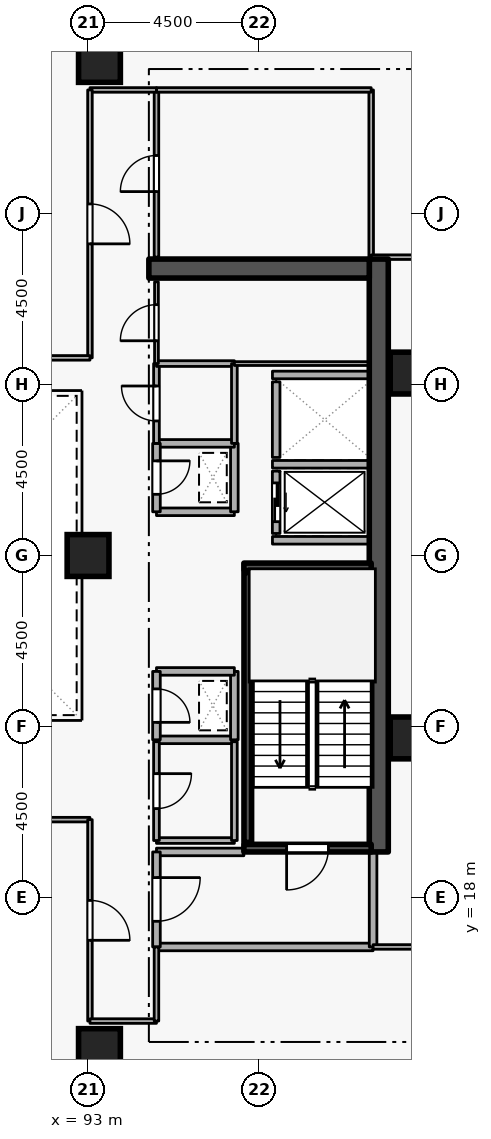
"""IFC4 building model, lengths in metres.
Left out: names, types, materials, properties, quantities, classifications, styles, units other than length and angle.
Written with IfcOpenShell. Run it as: python <this file> out.ifc"""

import sys

from ifc_helpers import new_model, si_unit, direction, frame, frame_2d, origin, origin_2d, place, context, subcontext, project, spatial, rectangle, extrude, element, fill, save


model = new_model("IFC4")
c1 = context("Model", 3, precision=1e-05, world=origin(), true_north=direction((0.0, 1.0)))
c2 = subcontext(c1, "Body", "Model", "MODEL_VIEW")
j1 = project(units=[si_unit("LENGTHUNIT", "METRE"), si_unit("PLANEANGLEUNIT", "RADIAN")], contexts=[c1])
p1 = place(None, origin())
s1 = spatial("IfcSite", under=j1, at=p1, CompositionType="ELEMENT")
p2 = place(p1, origin())
s2 = spatial("IfcBuilding", under=s1, at=p2, CompositionType="ELEMENT")
p3 = place(p2, frame((0.0, 0.0, 152.7)))
s3 = spatial("IfcBuildingStorey", under=s2, at=p3, CompositionType="ELEMENT", Elevation=152.7)
p4 = place(p3, frame((100.65, 19.2, 0.0), z_axis=(0.0, 0.0, 1.0), x_axis=(0.0, 1.0, 0.0)))
e1 = element("IfcWall", 1, at=p4, inside=s3, PredefinedType="SHEAR", context=c2, shape_type="SweptSolid", body=[
    extrude(rectangle(XDim=15.6, YDim=0.5, at=frame_2d((7.8, 0.0))), origin(), (0.0, 0.0, 1.0), 3.6),
])
p5 = place(p3, frame((94.6, 34.55, 0.0), z_axis=(0.0, 0.0, 1.0), x_axis=(1.0, 0.0, 0.0)))
e2 = element("IfcWall", 2, at=p5, inside=s3, PredefinedType="SHEAR", context=c2, shape_type="SweptSolid", body=[
    extrude(rectangle(XDim=5.8, YDim=0.5, at=frame_2d((2.9, 0.0))), origin(), (0.0, 0.0, 1.0), 3.6),
])
for number, where, z_axis, x_axis in (
    (3, (93.3, 14.0, 0.0), (0.0, 0.0, 1.0), (1.0, 0.0, 0.0)),
    (4, (93.3, 40.0, 0.0), (0.0, 0.0, 1.0), (1.0, 0.0, 0.0)),
    (5, (101.5, 22.2, 0.0), (0.0, 0.0, 1.0), (1.0, 0.0, 0.0)),
    (6, (101.5, 31.8, 0.0), (0.0, 0.0, 1.0), (1.0, 0.0, 0.0)),
    (7, (93.0, 27.0, 0.0), (0.0, 0.0, 1.0), (1.0, 0.0, 0.0)),
):
    element("IfcColumn", number, at=place(p3, frame(where, z_axis=z_axis, x_axis=x_axis)), inside=s3, PredefinedType="COLUMN", context=c2, shape_type="SweptSolid", body=[
        extrude(rectangle(XDim=1.1, YDim=1.1, at=origin_2d()), origin(), (0.0, 0.0, 1.0), 3.6),
    ])
p6 = place(p3, frame((97.95, 29.22, 0.0), z_axis=(0.0, 0.0, 1.0), x_axis=(0.0, -1.0, 0.0)))
e8 = element("IfcWall", 8, at=p6, inside=s3, PredefinedType="STANDARD", context=c2, shape_type="SweptSolid", body=[
    extrude(rectangle(XDim=1.64, YDim=0.2, at=frame_2d((0.82, 0.0))), origin(), (0.0, 0.0, 1.0), 3.34),
])
p7 = place(p6, frame((0.31, 0.0, 0.0)))
e9 = element("IfcOpeningElement", 9, at=p7, cuts=e8, PredefinedType="OPENING", context=c2, shape_type="SweptSolid", body=[
    extrude(rectangle(XDim=1.02, YDim=2.06, at=frame_2d((0.51, 1.03))), frame((0.0, 0.11, 0.0), z_axis=(0.0, -1.0, 0.0), x_axis=(1.0, 0.0, 0.0)), (0.0, 0.0, 1.0), 0.22),
])
p8 = place(p3, frame((97.95, 31.57, 0.0), z_axis=(0.0, 0.0, 1.0), x_axis=(0.0, -1.0, 0.0)))
e10 = element("IfcWall", 10, at=p8, inside=s3, PredefinedType="STANDARD", context=c2, shape_type="SweptSolid", body=[
    extrude(rectangle(XDim=1.99, YDim=0.2, at=frame_2d((0.995, 0.0))), origin(), (0.0, 0.0, 1.0), 3.34),
])
for number, where, z_axis, x_axis in (
    (11, (97.852, 29.4, 0.0), (0.0, 0.0, 1.0), (1.0, 0.0, 0.0)),
    (12, (97.852, 27.4, 0.0), (0.0, 0.0, 1.0), (1.0, 0.0, 0.0)),
    (13, (97.852, 31.75, 0.0), (0.0, 0.0, 1.0), (1.0, 0.0, 0.0)),
):
    element("IfcWall", number, at=place(p3, frame(where, z_axis=z_axis, x_axis=x_axis)), inside=s3, PredefinedType="STANDARD", context=c2, shape_type="SweptSolid", body=[
        extrude(rectangle(XDim=2.536, YDim=0.2, at=frame_2d((1.268, 0.0))), origin(), (0.0, 0.0, 1.0), 3.34),
    ])
p9 = place(p3, frame((100.45, 19.3, 0.0), z_axis=(0.0, 0.0, 1.0), x_axis=(-1.0, 0.0, 0.0)))
e14 = element("IfcWall", 14, at=p9, inside=s3, PredefinedType="SHEAR", context=c2, shape_type="SweptSolid", body=[
    extrude(rectangle(XDim=3.35, YDim=0.2, at=frame_2d((1.675, 0.0))), origin(), (0.0, 0.0, 1.0), 3.6),
])
p10 = place(p9, frame((1.125, 0.0, 0.0)))
e15 = element("IfcOpeningElement", 15, at=p10, cuts=e14, PredefinedType="OPENING", context=c2, shape_type="SweptSolid", body=[
    extrude(rectangle(XDim=1.1, YDim=2.1, at=frame_2d((0.55, 1.05))), frame((0.0, 0.11, 0.0), z_axis=(0.0, -1.0, 0.0), x_axis=(1.0, 0.0, 0.0)), (0.0, 0.0, 1.0), 0.22),
])
p11 = place(p3, frame((97.1, 26.7, 0.0), z_axis=(0.0, 0.0, 1.0), x_axis=(1.0, 0.0, 0.0)))
e16 = element("IfcWall", 16, at=p11, inside=s3, PredefinedType="SHEAR", context=c2, shape_type="SweptSolid", body=[
    extrude(rectangle(XDim=3.35, YDim=0.2, at=frame_2d((1.675, 0.0))), origin(), (0.0, 0.0, 1.0), 3.6),
])
p12 = place(p3, frame((97.203, 26.55, 0.0), z_axis=(0.0, 0.0, 1.0), x_axis=(0.0, -1.0, 0.0)))
e17 = element("IfcWall", 17, at=p12, inside=s3, PredefinedType="SHEAR", context=c2, shape_type="SweptSolid", body=[
    extrude(rectangle(XDim=7.1, YDim=0.2, at=frame_2d((3.55, 0.0))), origin(), (0.0, 0.0, 1.0), 3.6),
])
p13 = place(p3, frame((94.8, 16.7, 0.0), z_axis=(0.0, 0.0, 1.0), x_axis=(1.0, 0.0, 0.0)))
e18 = element("IfcWall", 18, at=p13, inside=s3, PredefinedType="STANDARD", context=c2, shape_type="SweptSolid", body=[
    extrude(rectangle(XDim=5.7, YDim=0.2, at=frame_2d((2.85, 0.0))), origin(), (0.0, 0.0, 1.0), 3.34),
])
p14 = place(p3, frame((100.5, 16.7, 0.0), z_axis=(0.0, 0.0, 1.0), x_axis=(0.0, 1.0, 0.0)))
e19 = element("IfcWall", 19, at=p14, inside=s3, PredefinedType="STANDARD", context=c2, shape_type="SweptSolid", body=[
    extrude(rectangle(XDim=2.5, YDim=0.2, at=frame_2d((1.25, 0.0))), origin(), (0.0, 0.0, 1.0), 3.34),
])
p15 = place(p3, frame((97.1, 19.2, 0.0), z_axis=(0.0, 0.0, 1.0), x_axis=(-1.0, 0.0, 0.0)))
e20 = element("IfcWall", 20, at=p15, inside=s3, PredefinedType="STANDARD", context=c2, shape_type="SweptSolid", body=[
    extrude(rectangle(XDim=2.3, YDim=0.2, at=frame_2d((1.15, 0.0))), origin(), (0.0, 0.0, 1.0), 2.545),
])
p16 = place(p3, frame((94.8, 19.2, 0.0), z_axis=(0.0, 0.0, 1.0), x_axis=(0.0, -1.0, 0.0)))
e21 = element("IfcWall", 21, at=p16, inside=s3, PredefinedType="STANDARD", context=c2, shape_type="SweptSolid", body=[
    extrude(rectangle(XDim=2.5, YDim=0.2, at=frame_2d((1.25, 0.0))), origin(), (0.0, 0.0, 1.0), 3.34),
])
p17 = place(p16, frame((0.675, 0.0, 0.0)))
e22 = element("IfcOpeningElement", 22, at=p17, cuts=e21, PredefinedType="OPENING", context=c2, shape_type="SweptSolid", body=[
    extrude(rectangle(XDim=1.15, YDim=2.1, at=frame_2d((0.575, 1.05))), frame((0.0, 0.11, 0.0), z_axis=(0.0, -1.0, 0.0), x_axis=(1.0, 0.0, 0.0)), (0.0, 0.0, 1.0), 0.22),
])
p18 = place(p3, frame((94.8, 28.15, 0.0), z_axis=(0.0, 0.0, 1.0), x_axis=(1.0, 0.0, 0.0)))
e23 = element("IfcWall", 23, at=p18, inside=s3, PredefinedType="STANDARD", context=c2, shape_type="SweptSolid", body=[
    extrude(rectangle(XDim=2.05, YDim=0.2, at=frame_2d((1.025, 0.0))), origin(), (0.0, 0.0, 1.0), 3.34),
])
p19 = place(p3, frame((96.85, 28.15, 0.0), z_axis=(0.0, 0.0, 1.0), x_axis=(0.0, 1.0, 0.0)))
e24 = element("IfcWall", 24, at=p19, inside=s3, PredefinedType="STANDARD", context=c2, shape_type="SweptSolid", body=[
    extrude(rectangle(XDim=1.8, YDim=0.2, at=frame_2d((0.9, 0.0))), origin(), (0.0, 0.0, 1.0), 3.34),
])
p20 = place(p3, frame((96.85, 29.95, 0.0), z_axis=(0.0, 0.0, 1.0), x_axis=(-1.0, 0.0, 0.0)))
e25 = element("IfcWall", 25, at=p20, inside=s3, PredefinedType="STANDARD", context=c2, shape_type="SweptSolid", body=[
    extrude(rectangle(XDim=2.05, YDim=0.2, at=frame_2d((1.025, 0.0))), origin(), (0.0, 0.0, 1.0), 3.34),
])
p21 = place(p3, frame((94.8, 29.95, 0.0), z_axis=(0.0, 0.0, 1.0), x_axis=(0.0, -1.0, 0.0)))
e26 = element("IfcWall", 26, at=p21, inside=s3, PredefinedType="STANDARD", context=c2, shape_type="SweptSolid", body=[
    extrude(rectangle(XDim=1.8, YDim=0.2, at=frame_2d((0.9, 0.0))), origin(), (0.0, 0.0, 1.0), 3.34),
])
p22 = place(p21, frame((0.46, 0.0, 0.0)))
e27 = element("IfcOpeningElement", 27, at=p22, cuts=e26, PredefinedType="OPENING", context=c2, shape_type="SweptSolid", body=[
    extrude(rectangle(XDim=0.88, YDim=2.04, at=frame_2d((0.44, 1.02))), frame((0.0, 0.11, 0.0), z_axis=(0.0, -1.0, 0.0), x_axis=(1.0, 0.0, 0.0)), (0.0, 0.0, 1.0), 0.22),
])
p23 = place(p3, frame((94.8, 22.15, 0.0), z_axis=(0.0, 0.0, 1.0), x_axis=(1.0, 0.0, 0.0)))
e28 = element("IfcWall", 28, at=p23, inside=s3, PredefinedType="STANDARD", context=c2, shape_type="SweptSolid", body=[
    extrude(rectangle(XDim=2.05, YDim=0.2, at=frame_2d((1.025, 0.0))), origin(), (0.0, 0.0, 1.0), 3.34),
])
p24 = place(p3, frame((96.85, 22.15, 0.0), z_axis=(0.0, 0.0, 1.0), x_axis=(0.0, 1.0, 0.0)))
e29 = element("IfcWall", 29, at=p24, inside=s3, PredefinedType="STANDARD", context=c2, shape_type="SweptSolid", body=[
    extrude(rectangle(XDim=1.8, YDim=0.2, at=frame_2d((0.9, 0.0))), origin(), (0.0, 0.0, 1.0), 3.34),
])
p25 = place(p3, frame((96.85, 23.95, 0.0), z_axis=(0.0, 0.0, 1.0), x_axis=(-1.0, 0.0, 0.0)))
e30 = element("IfcWall", 30, at=p25, inside=s3, PredefinedType="STANDARD", context=c2, shape_type="SweptSolid", body=[
    extrude(rectangle(XDim=2.05, YDim=0.2, at=frame_2d((1.025, 0.0))), origin(), (0.0, 0.0, 1.0), 3.34),
])
p26 = place(p3, frame((94.8, 23.95, 0.0), z_axis=(0.0, 0.0, 1.0), x_axis=(0.0, -1.0, 0.0)))
e31 = element("IfcWall", 31, at=p26, inside=s3, PredefinedType="STANDARD", context=c2, shape_type="SweptSolid", body=[
    extrude(rectangle(XDim=1.8, YDim=0.2, at=frame_2d((0.9, 0.0))), origin(), (0.0, 0.0, 1.0), 3.34),
])
p27 = place(p26, frame((0.46, 0.0, 0.0)))
e32 = element("IfcOpeningElement", 32, at=p27, cuts=e31, PredefinedType="OPENING", context=c2, shape_type="SweptSolid", body=[
    extrude(rectangle(XDim=0.88, YDim=2.04, at=frame_2d((0.44, 1.02))), frame((0.0, 0.11, 0.0), z_axis=(0.0, -1.0, 0.0), x_axis=(1.0, 0.0, 0.0)), (0.0, 0.0, 1.0), 0.22),
])
p28 = place(p3, frame((94.8, 19.5, 0.0), z_axis=(0.0, 0.0, 1.0), x_axis=(1.0, 0.0, 0.0)))
e33 = element("IfcWall", 33, at=p28, inside=s3, PredefinedType="PARTITIONING", context=c2, shape_type="SweptSolid", body=[
    extrude(rectangle(XDim=2.05, YDim=0.15, at=frame_2d((1.025, 0.0))), origin(), (0.0, 0.0, 1.0), 2.545),
])
p29 = place(p3, frame((96.85, 19.5, 0.0), z_axis=(0.0, 0.0, 1.0), x_axis=(0.0, 1.0, 0.0)))
e34 = element("IfcWall", 34, at=p29, inside=s3, PredefinedType="PARTITIONING", context=c2, shape_type="SweptSolid", body=[
    extrude(rectangle(XDim=2.6, YDim=0.15, at=frame_2d((1.3, 0.0))), origin(), (0.0, 0.0, 1.0), 3.34),
])
p30 = place(p3, frame((94.8, 22.1, 0.0), z_axis=(0.0, 0.0, 1.0), x_axis=(0.0, -1.0, 0.0)))
e35 = element("IfcWall", 35, at=p30, inside=s3, PredefinedType="PARTITIONING", context=c2, shape_type="SweptSolid", body=[
    extrude(rectangle(XDim=2.6, YDim=0.15, at=frame_2d((1.3, 0.0))), origin(), (0.0, 0.0, 1.0), 3.34),
])
p31 = place(p30, frame((0.84, 0.0, 0.0)))
e36 = element("IfcOpeningElement", 36, at=p31, cuts=e35, PredefinedType="OPENING", context=c2, shape_type="SweptSolid", body=[
    extrude(rectangle(XDim=0.92, YDim=2.08, at=frame_2d((0.46, 1.04))), frame((0.0, 0.085, 0.0), z_axis=(0.0, -1.0, 0.0), x_axis=(1.0, 0.0, 0.0)), (0.0, 0.0, 1.0), 0.17),
])
p32 = place(p3, frame((94.8, 29.95, 0.0), z_axis=(0.0, 0.0, 1.0), x_axis=(0.0, 1.0, 0.0)))
e37 = element("IfcWall", 37, at=p32, inside=s3, PredefinedType="PARTITIONING", context=c2, shape_type="SweptSolid", body=[
    extrude(rectangle(XDim=2.1, YDim=0.15, at=frame_2d((1.05, 0.0))), origin(), (0.0, 0.0, 1.0), 3.34),
])
p33 = place(p32, frame((0.59, 0.0, 0.0)))
e38 = element("IfcOpeningElement", 38, at=p33, cuts=e37, PredefinedType="OPENING", context=c2, shape_type="SweptSolid", body=[
    extrude(rectangle(XDim=0.92, YDim=2.08, at=frame_2d((0.46, 1.04))), frame((0.0, 0.085, 0.0), z_axis=(0.0, -1.0, 0.0), x_axis=(1.0, 0.0, 0.0)), (0.0, 0.0, 1.0), 0.17),
])
p34 = place(p3, frame((94.8, 32.05, 0.0), z_axis=(0.0, 0.0, 1.0), x_axis=(1.0, 0.0, 0.0)))
e39 = element("IfcWall", 39, at=p34, inside=s3, PredefinedType="PARTITIONING", context=c2, shape_type="SweptSolid", body=[
    extrude(rectangle(XDim=2.05, YDim=0.15, at=frame_2d((1.025, 0.0))), origin(), (0.0, 0.0, 1.0), 3.34),
])
p35 = place(p3, frame((96.85, 32.05, 0.0), z_axis=(0.0, 0.0, 1.0), x_axis=(0.0, -1.0, 0.0)))
e40 = element("IfcWall", 40, at=p35, inside=s3, PredefinedType="PARTITIONING", context=c2, shape_type="SweptSolid", body=[
    extrude(rectangle(XDim=2.1, YDim=0.15, at=frame_2d((1.05, 0.0))), origin(), (0.0, 0.0, 1.0), 3.34),
])
p36 = place(p3, frame((94.8, 32.05, 0.0), z_axis=(0.0, 0.0, 1.0), x_axis=(0.0, 1.0, 0.0)))
e41 = element("IfcWall", 41, at=p36, inside=s3, PredefinedType="PARTITIONING", context=c2, shape_type="SweptSolid", body=[
    extrude(rectangle(XDim=2.15, YDim=0.1, at=frame_2d((1.075, 0.0))), origin(), (0.0, 0.0, 1.0), 3.34),
])
p37 = place(p36, frame((0.6, 0.0, 0.0)))
e42 = element("IfcOpeningElement", 42, at=p37, cuts=e41, PredefinedType="OPENING", context=c2, shape_type="SweptSolid", body=[
    extrude(rectangle(XDim=0.95, YDim=2.1, at=frame_2d((0.475, 1.05))), frame((0.0, 0.06, 0.0), z_axis=(0.0, -1.0, 0.0), x_axis=(1.0, 0.0, 0.0)), (0.0, 0.0, 1.0), 0.12),
])
p38 = place(p3, frame((100.4, 32.05, 0.0), z_axis=(0.0, 0.0, 1.0), x_axis=(-1.0, 0.0, 0.0)))
e43 = element("IfcWall", 43, at=p38, inside=s3, PredefinedType="PARTITIONING", context=c2, shape_type="SweptSolid", body=[
    extrude(rectangle(XDim=3.55, YDim=0.1, at=frame_2d((1.775, 0.0))), origin(), (0.0, 0.0, 1.0), 3.34),
])
p39 = place(p3, frame((100.45, 39.25, 0.0), z_axis=(0.0, 0.0, 1.0), x_axis=(0.0, -1.0, 0.0)))
e44 = element("IfcWall", 44, at=p39, inside=s3, PredefinedType="PARTITIONING", context=c2, shape_type="SweptSolid", body=[
    extrude(rectangle(XDim=4.4, YDim=0.12, at=frame_2d((2.2, 0.0))), origin(), (0.0, 0.0, 1.0), 3.34),
])
p40 = place(p3, frame((94.8, 34.85, 0.0), z_axis=(0.0, 0.0, 1.0), x_axis=(0.0, 1.0, 0.0)))
e45 = element("IfcWall", 45, at=p40, inside=s3, PredefinedType="PARTITIONING", context=c2, shape_type="SweptSolid", body=[
    extrude(rectangle(XDim=4.4, YDim=0.12, at=frame_2d((2.2, 0.0))), origin(), (0.0, 0.0, 1.0), 3.34),
])
p41 = place(p40, frame((1.725, 0.0, 0.0)))
e46 = element("IfcOpeningElement", 46, at=p41, cuts=e45, PredefinedType="OPENING", context=c2, shape_type="SweptSolid", body=[
    extrude(rectangle(XDim=0.95, YDim=2.1, at=frame_2d((0.475, 1.05))), frame((0.0, 0.07, 0.0), z_axis=(0.0, -1.0, 0.0), x_axis=(1.0, 0.0, 0.0)), (0.0, 0.0, 1.0), 0.14),
])
p42 = place(p3, frame((94.8, 39.25, 0.0), z_axis=(0.0, 0.0, 1.0), x_axis=(1.0, 0.0, 0.0)))
e47 = element("IfcWall", 47, at=p42, inside=s3, PredefinedType="PARTITIONING", context=c2, shape_type="SweptSolid", body=[
    extrude(rectangle(XDim=5.65, YDim=0.12, at=frame_2d((2.825, 0.0))), origin(), (0.0, 0.0, 1.0), 3.34),
])
p43 = place(p3, frame((88.5, 20.05, 0.0), z_axis=(0.0, 0.0, 1.0), x_axis=(1.0, 0.0, 0.0)))
e48 = element("IfcWall", 48, at=p43, inside=s3, PredefinedType="PARTITIONING", context=c2, shape_type="SweptSolid", body=[
    extrude(rectangle(XDim=4.55, YDim=0.12, at=frame_2d((2.275, 0.0))), origin(), (0.0, 0.0, 1.0), 3.34),
])
p44 = place(p3, frame((93.05, 20.05, 0.0), z_axis=(0.0, 0.0, 1.0), x_axis=(0.0, -1.0, 0.0)))
e49 = element("IfcWall", 49, at=p44, inside=s3, PredefinedType="PARTITIONING", context=c2, shape_type="SweptSolid", body=[
    extrude(rectangle(XDim=5.3, YDim=0.12, at=frame_2d((2.65, 0.0))), origin(), (0.0, 0.0, 1.0), 3.34),
])
p45 = place(p44, frame((2.125, 0.0, 0.0)))
e50 = element("IfcOpeningElement", 50, at=p45, cuts=e49, PredefinedType="OPENING", context=c2, shape_type="SweptSolid", body=[
    extrude(rectangle(XDim=1.05, YDim=2.1, at=frame_2d((0.525, 1.05))), frame((0.0, 0.07, 0.0), z_axis=(0.0, -1.0, 0.0), x_axis=(1.0, 0.0, 0.0)), (0.0, 0.0, 1.0), 0.14),
])
p46 = place(p3, frame((93.05, 14.75, 0.0), z_axis=(0.0, 0.0, 1.0), x_axis=(1.0, 0.0, 0.0)))
e51 = element("IfcWall", 51, at=p46, inside=s3, PredefinedType="PARTITIONING", context=c2, shape_type="SweptSolid", body=[
    extrude(rectangle(XDim=1.75, YDim=0.12, at=frame_2d((0.875, 0.0))), origin(), (0.0, 0.0, 1.0), 3.34),
])
p47 = place(p3, frame((94.8, 14.75, 0.0), z_axis=(0.0, 0.0, 1.0), x_axis=(0.0, 1.0, 0.0)))
e52 = element("IfcWall", 52, at=p47, inside=s3, PredefinedType="PARTITIONING", context=c2, shape_type="SweptSolid", body=[
    extrude(rectangle(XDim=1.95, YDim=0.12, at=frame_2d((0.975, 0.0))), origin(), (0.0, 0.0, 1.0), 3.34),
])
p48 = place(p3, frame((100.5, 16.7, 0.0), z_axis=(0.0, 0.0, 1.0), x_axis=(1.0, 0.0, 0.0)))
e53 = element("IfcWall", 53, at=p48, inside=s3, PredefinedType="PARTITIONING", context=c2, shape_type="SweptSolid", body=[
    extrude(rectangle(XDim=11.72, YDim=0.12, at=frame_2d((5.86, 0.0))), origin(), (0.0, 0.0, 1.0), 3.34),
])
p49 = place(p3, frame((94.8, 39.25, 0.0), z_axis=(0.0, 0.0, 1.0), x_axis=(-1.0, 0.0, 0.0)))
e54 = element("IfcWall", 54, at=p49, inside=s3, PredefinedType="PARTITIONING", context=c2, shape_type="SweptSolid", body=[
    extrude(rectangle(XDim=1.75, YDim=0.12, at=frame_2d((0.875, 0.0))), origin(), (0.0, 0.0, 1.0), 3.34),
])
p50 = place(p3, frame((93.05, 39.25, 0.0), z_axis=(0.0, 0.0, 1.0), x_axis=(0.0, -1.0, 0.0)))
e55 = element("IfcWall", 55, at=p50, inside=s3, PredefinedType="PARTITIONING", context=c2, shape_type="SweptSolid", body=[
    extrude(rectangle(XDim=7.05, YDim=0.12, at=frame_2d((3.525, 0.0))), origin(), (0.0, 0.0, 1.0), 3.34),
])
p51 = place(p50, frame((3.0, 0.0, 0.0)))
e56 = element("IfcOpeningElement", 56, at=p51, cuts=e55, PredefinedType="OPENING", context=c2, shape_type="SweptSolid", body=[
    extrude(rectangle(XDim=1.05, YDim=2.1, at=frame_2d((0.525, 1.05))), frame((0.0, 0.07, 0.0), z_axis=(0.0, -1.0, 0.0), x_axis=(1.0, 0.0, 0.0)), (0.0, 0.0, 1.0), 0.14),
])
p52 = place(p3, frame((93.05, 32.2, 0.0), z_axis=(0.0, 0.0, 1.0), x_axis=(-1.0, 0.0, 0.0)))
e57 = element("IfcWall", 57, at=p52, inside=s3, PredefinedType="PARTITIONING", context=c2, shape_type="SweptSolid", body=[
    extrude(rectangle(XDim=4.55, YDim=0.12, at=frame_2d((2.275, 0.0))), origin(), (0.0, 0.0, 1.0), 3.34),
])
p53 = place(p3, frame((112.22, 34.85, 0.0), z_axis=(0.0, 0.0, 1.0), x_axis=(-1.0, 0.0, 0.0)))
e58 = element("IfcWall", 58, at=p53, inside=s3, PredefinedType="PARTITIONING", context=c2, shape_type="SweptSolid", body=[
    extrude(rectangle(XDim=11.77, YDim=0.12, at=frame_2d((5.885, 0.0))), origin(), (0.0, 0.0, 1.0), 2.545),
])
p54 = place(p7, origin())
e59 = element("IfcDoor", 59, at=p54, inside=s3, OperationType="SLIDING_TO_LEFT", PredefinedType="DOOR", context=c2, shape_type="SweptSolid", body=[
    extrude(rectangle(XDim=1.02, YDim=2.06, at=frame_2d((0.51, 1.03))), frame((0.0, 0.025, 0.0), z_axis=(0.0, -1.0, 0.0), x_axis=(1.0, 0.0, 0.0)), (0.0, 0.0, 1.0), 0.05),
])
fill(e9, e59)
p55 = place(p10, origin())
e60 = element("IfcDoor", 60, at=p55, inside=s3, OperationType="SINGLE_SWING_RIGHT", PredefinedType="DOOR", context=c2, shape_type="SweptSolid", body=[
    extrude(rectangle(XDim=1.1, YDim=2.1, at=frame_2d((0.55, 1.05))), frame((0.0, 0.025, 0.0), z_axis=(0.0, -1.0, 0.0), x_axis=(1.0, 0.0, 0.0)), (0.0, 0.0, 1.0), 0.05),
])
fill(e15, e60)
p56 = place(p17, origin())
e61 = element("IfcDoor", 61, at=p56, inside=s3, OperationType="SINGLE_SWING_LEFT", PredefinedType="DOOR", context=c2, shape_type="SweptSolid", body=[
    extrude(rectangle(XDim=1.15, YDim=2.1, at=frame_2d((0.575, 1.05))), frame((0.0, 0.025, 0.0), z_axis=(0.0, -1.0, 0.0), x_axis=(1.0, 0.0, 0.0)), (0.0, 0.0, 1.0), 0.05),
])
fill(e22, e61)
p57 = place(p22, origin())
e62 = element("IfcDoor", 62, at=p57, inside=s3, OperationType="SINGLE_SWING_LEFT", PredefinedType="DOOR", context=c2, shape_type="SweptSolid", body=[
    extrude(rectangle(XDim=0.88, YDim=2.04, at=frame_2d((0.44, 1.02))), frame((0.0, 0.025, 0.0), z_axis=(0.0, -1.0, 0.0), x_axis=(1.0, 0.0, 0.0)), (0.0, 0.0, 1.0), 0.05),
])
fill(e27, e62)
p58 = place(p27, origin())
e63 = element("IfcDoor", 63, at=p58, inside=s3, OperationType="SINGLE_SWING_RIGHT", PredefinedType="DOOR", context=c2, shape_type="SweptSolid", body=[
    extrude(rectangle(XDim=0.88, YDim=2.04, at=frame_2d((0.44, 1.02))), frame((0.0, 0.025, 0.0), z_axis=(0.0, -1.0, 0.0), x_axis=(1.0, 0.0, 0.0)), (0.0, 0.0, 1.0), 0.05),
])
fill(e32, e63)
p59 = place(p31, origin())
e64 = element("IfcDoor", 64, at=p59, inside=s3, OperationType="SINGLE_SWING_LEFT", PredefinedType="DOOR", context=c2, shape_type="SweptSolid", body=[
    extrude(rectangle(XDim=0.92, YDim=2.08, at=frame_2d((0.46, 1.04))), frame((0.0, 0.025, 0.0), z_axis=(0.0, -1.0, 0.0), x_axis=(1.0, 0.0, 0.0)), (0.0, 0.0, 1.0), 0.05),
])
fill(e36, e64)
p60 = place(p33, origin())
e65 = element("IfcDoor", 65, at=p60, inside=s3, OperationType="SINGLE_SWING_RIGHT", PredefinedType="DOOR", context=c2, shape_type="SweptSolid", body=[
    extrude(rectangle(XDim=0.92, YDim=2.08, at=frame_2d((0.46, 1.04))), frame((0.0, 0.025, 0.0), z_axis=(0.0, -1.0, 0.0), x_axis=(1.0, 0.0, 0.0)), (0.0, 0.0, 1.0), 0.05),
])
fill(e38, e65)
p61 = place(p37, origin())
e66 = element("IfcDoor", 66, at=p61, inside=s3, OperationType="SINGLE_SWING_LEFT", PredefinedType="DOOR", context=c2, shape_type="SweptSolid", body=[
    extrude(rectangle(XDim=0.95, YDim=2.1, at=frame_2d((0.475, 1.05))), frame((0.0, 0.025, 0.0), z_axis=(0.0, -1.0, 0.0), x_axis=(1.0, 0.0, 0.0)), (0.0, 0.0, 1.0), 0.05),
])
fill(e42, e66)
p62 = place(p41, origin())
e67 = element("IfcDoor", 67, at=p62, inside=s3, OperationType="SINGLE_SWING_LEFT", PredefinedType="DOOR", context=c2, shape_type="SweptSolid", body=[
    extrude(rectangle(XDim=0.95, YDim=2.1, at=frame_2d((0.475, 1.05))), frame((0.0, 0.025, 0.0), z_axis=(0.0, -1.0, 0.0), x_axis=(1.0, 0.0, 0.0)), (0.0, 0.0, 1.0), 0.05),
])
fill(e46, e67)
p63 = place(p45, origin())
e68 = element("IfcDoor", 68, at=p63, inside=s3, OperationType="SINGLE_SWING_RIGHT", PredefinedType="DOOR", context=c2, shape_type="SweptSolid", body=[
    extrude(rectangle(XDim=1.05, YDim=2.1, at=frame_2d((0.525, 1.05))), frame((0.0, 0.025, 0.0), z_axis=(0.0, -1.0, 0.0), x_axis=(1.0, 0.0, 0.0)), (0.0, 0.0, 1.0), 0.05),
])
fill(e50, e68)
p64 = place(p51, origin())
e69 = element("IfcDoor", 69, at=p64, inside=s3, OperationType="SINGLE_SWING_RIGHT", PredefinedType="DOOR", context=c2, shape_type="SweptSolid", body=[
    extrude(rectangle(XDim=1.05, YDim=2.1, at=frame_2d((0.525, 1.05))), frame((0.0, 0.025, 0.0), z_axis=(0.0, -1.0, 0.0), x_axis=(1.0, 0.0, 0.0)), (0.0, 0.0, 1.0), 0.05),
])
fill(e56, e69)
save(model, sys.argv[1])
